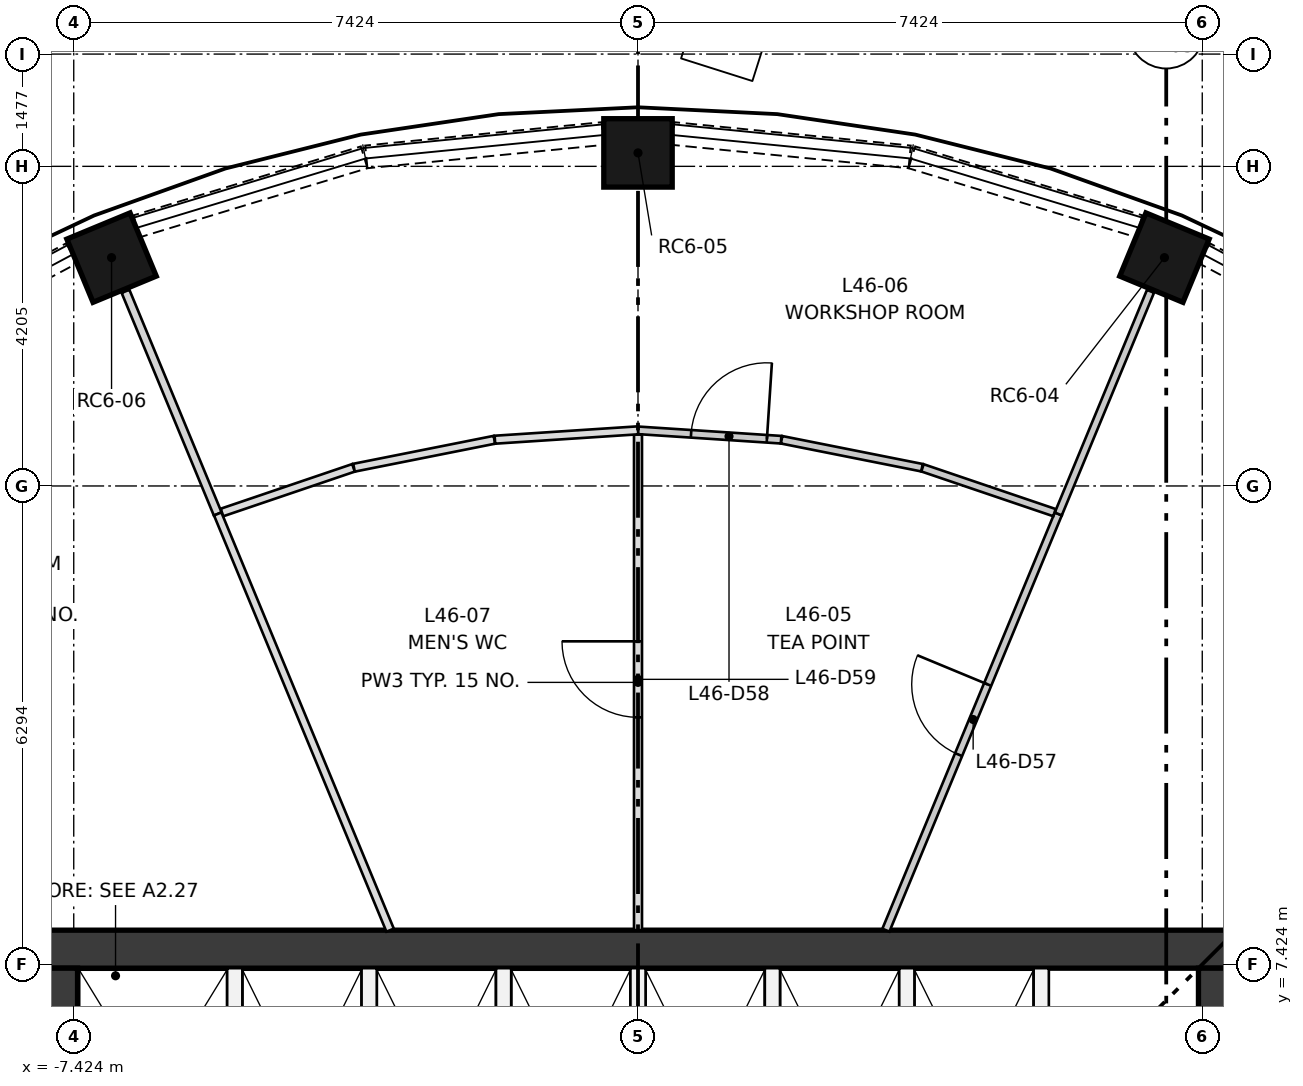
"""IFC4 building model, lengths in metres.
Left out: names, types, materials, properties, quantities, classifications, styles, units other than length and angle.
Written with IfcOpenShell. Run it as: python <this file> out.ifc"""

import sys

from ifc_helpers import new_model, si_unit, direction, frame, frame_2d, origin, origin_2d, place, context, subcontext, project, spatial, rectangle, extrude, element, fill, save


model = new_model("IFC4")
c1 = context("Model", 3, precision=1e-05, world=origin(), true_north=direction((0.0, 1.0)))
c2 = subcontext(c1, "Body", "Model", "MODEL_VIEW")
j1 = project(units=[si_unit("LENGTHUNIT", "METRE"), si_unit("PLANEANGLEUNIT", "RADIAN")], contexts=[c1])
p1 = place(None, origin())
s1 = spatial("IfcSite", under=j1, at=p1, CompositionType="ELEMENT")
p2 = place(p1, origin())
s2 = spatial("IfcBuilding", under=s1, at=p2, CompositionType="ELEMENT")
p3 = place(p2, frame((0.0, 0.0, 174.25)))
s3 = spatial("IfcBuildingStorey", under=s2, at=p3, CompositionType="ELEMENT", Elevation=174.25)
for number, where, z_axis, x_axis in (
    (1, (6.927, 16.722, 0.0), (0.0, 0.0, 1.0), (0.383, 0.924, 0.0)),
    (2, (0.0, 18.1, 0.0), (0.0, 0.0, 1.0), (0.0, 1.0, 0.0)),
    (3, (-6.927, 16.722, 0.0), (0.0, 0.0, 1.0), (-0.383, 0.924, 0.0)),
):
    element("IfcColumn", number, at=place(p3, frame(where, z_axis=z_axis, x_axis=x_axis)), inside=s3, PredefinedType="COLUMN", context=c2, shape_type="SweptSolid", body=[
        extrude(rectangle(XDim=0.9, YDim=0.9, at=origin_2d()), origin(), (0.0, 0.0, 1.0), 3.35),
    ])
p4 = place(p3, frame((-7.874, 7.624, 0.0), z_axis=(0.0, 0.0, 1.0), x_axis=(1.0, 0.0, 0.0)))
e4 = element("IfcWall", 4, at=p4, inside=s3, PredefinedType="SHEAR", context=c2, shape_type="SweptSolid", body=[
    extrude(rectangle(XDim=15.748, YDim=0.5, at=frame_2d((7.874, 0.0))), origin(), (0.0, 0.0, 1.0), 3.35),
])
p5 = place(p3, frame((-7.624, -7.374, 0.0), z_axis=(0.0, 0.0, 1.0), x_axis=(0.0, 1.0, 0.0)))
e5 = element("IfcWall", 5, at=p5, inside=s3, PredefinedType="SHEAR", context=c2, shape_type="SweptSolid", body=[
    extrude(rectangle(XDim=14.748, YDim=0.5, at=frame_2d((7.374, 0.0))), origin(), (0.0, 0.0, 1.0), 3.35),
])
p6 = place(p5, frame((6.874, 0.0, 0.0)))
e6 = element("IfcOpeningElement", 6, at=p6, cuts=e5, PredefinedType="OPENING", context=c2, shape_type="SweptSolid", body=[
    extrude(rectangle(XDim=1.0, YDim=2.1, at=frame_2d((0.5, 1.05))), frame((0.0, 0.26, 0.0), z_axis=(0.0, -1.0, 0.0), x_axis=(1.0, 0.0, 0.0)), (0.0, 0.0, 1.0), 0.52),
])
p7 = place(p5, frame((3.75, 0.0, 0.0)))
e7 = element("IfcOpeningElement", 7, at=p7, cuts=e5, PredefinedType="OPENING", context=c2, shape_type="SweptSolid", body=[
    extrude(rectangle(XDim=1.8, YDim=2.1, at=frame_2d((0.9, 1.05))), frame((0.0, 0.26, 0.0), z_axis=(0.0, -1.0, 0.0), x_axis=(1.0, 0.0, 0.0)), (0.0, 0.0, 1.0), 0.52),
])
p8 = place(p5, frame((9.198, 0.0, 0.0)))
e8 = element("IfcOpeningElement", 8, at=p8, cuts=e5, PredefinedType="OPENING", context=c2, shape_type="SweptSolid", body=[
    extrude(rectangle(XDim=1.8, YDim=2.1, at=frame_2d((0.9, 1.05))), frame((0.0, 0.26, 0.0), z_axis=(0.0, -1.0, 0.0), x_axis=(1.0, 0.0, 0.0)), (0.0, 0.0, 1.0), 0.52),
])
p9 = place(p3, frame((7.624, -7.374, 0.0), z_axis=(0.0, 0.0, 1.0), x_axis=(0.0, 1.0, 0.0)))
e9 = element("IfcWall", 9, at=p9, inside=s3, PredefinedType="SHEAR", context=c2, shape_type="SweptSolid", body=[
    extrude(rectangle(XDim=14.748, YDim=0.5, at=frame_2d((7.374, 0.0))), origin(), (0.0, 0.0, 1.0), 3.35),
])
p10 = place(p9, frame((6.874, 0.0, 0.0)))
e10 = element("IfcOpeningElement", 10, at=p10, cuts=e9, PredefinedType="OPENING", context=c2, shape_type="SweptSolid", body=[
    extrude(rectangle(XDim=1.0, YDim=2.1, at=frame_2d((0.5, 1.05))), frame((0.0, 0.26, 0.0), z_axis=(0.0, -1.0, 0.0), x_axis=(1.0, 0.0, 0.0)), (0.0, 0.0, 1.0), 0.52),
])
p11 = place(p9, frame((3.75, 0.0, 0.0)))
e11 = element("IfcOpeningElement", 11, at=p11, cuts=e9, PredefinedType="OPENING", context=c2, shape_type="SweptSolid", body=[
    extrude(rectangle(XDim=1.8, YDim=2.1, at=frame_2d((0.9, 1.05))), frame((0.0, 0.26, 0.0), z_axis=(0.0, -1.0, 0.0), x_axis=(1.0, 0.0, 0.0)), (0.0, 0.0, 1.0), 0.52),
])
p12 = place(p9, frame((9.198, 0.0, 0.0)))
e12 = element("IfcOpeningElement", 12, at=p12, cuts=e9, PredefinedType="OPENING", context=c2, shape_type="SweptSolid", body=[
    extrude(rectangle(XDim=1.8, YDim=2.1, at=frame_2d((0.9, 1.05))), frame((0.0, 0.26, 0.0), z_axis=(0.0, -1.0, 0.0), x_axis=(1.0, 0.0, 0.0)), (0.0, 0.0, 1.0), 0.52),
])
for number, where, z_axis, x_axis in (
    (13, (-5.305, 4.174, 0.0), (0.0, 0.0, 1.0), (0.0, 1.0, 0.0)),
    (14, (-3.537, 4.174, 0.0), (0.0, 0.0, 1.0), (0.0, 1.0, 0.0)),
    (15, (-1.769, 4.174, 0.0), (0.0, 0.0, 1.0), (0.0, 1.0, 0.0)),
    (16, (0.0, 4.174, 0.0), (0.0, 0.0, 1.0), (0.0, 1.0, 0.0)),
    (17, (1.769, 4.174, 0.0), (0.0, 0.0, 1.0), (0.0, 1.0, 0.0)),
    (18, (3.537, 4.174, 0.0), (0.0, 0.0, 1.0), (0.0, 1.0, 0.0)),
    (19, (5.305, 4.174, 0.0), (0.0, 0.0, 1.0), (0.0, 1.0, 0.0)),
):
    element("IfcWall", number, at=place(p3, frame(where, z_axis=z_axis, x_axis=x_axis)), inside=s3, PredefinedType="PARTITIONING", context=c2, shape_type="SweptSolid", body=[
        extrude(rectangle(XDim=3.2, YDim=0.2, at=frame_2d((1.6, 0.0))), origin(), (0.0, 0.0, 1.0), 3.0),
    ])
p13 = place(p3, frame((10.209, 15.306, 0.0), z_axis=(0.0, 0.0, 1.0), x_axis=(-0.882024038027, 0.47120441036, 0.0)))
e20 = element("IfcWall", 20, at=p13, inside=s3, PredefinedType="SOLIDWALL", context=c2, shape_type="SweptSolid", body=[
    extrude(rectangle(XDim=3.125, YDim=0.3, at=frame_2d((1.562, 0.0))), origin(), (0.0, 0.0, 1.0), 0.9),
])
p14 = place(p3, frame((6.596, 17.135, 0.0), z_axis=(0.0, 0.0, 1.0), x_axis=(-0.957001416136, 0.290083245834, 0.0)))
e21 = element("IfcWall", 21, at=p14, inside=s3, PredefinedType="SOLIDWALL", context=c2, shape_type="SweptSolid", body=[
    extrude(rectangle(XDim=3.127, YDim=0.3, at=frame_2d((1.563, 0.0))), origin(), (0.0, 0.0, 1.0), 0.9),
])
for number, where, z_axis, x_axis in (
    (22, (3.574, 18.048, 0.0), (0.0, 0.0, 1.0), (-0.995, 0.098, 0.0)),
    (23, (-0.464, 18.354, 0.0), (0.0, 0.0, 1.0), (-0.995, -0.098, 0.0)),
):
    element("IfcWall", number, at=place(p3, frame(where, z_axis=z_axis, x_axis=x_axis)), inside=s3, PredefinedType="SOLIDWALL", context=c2, shape_type="SweptSolid", body=[
        extrude(rectangle(XDim=3.125, YDim=0.3, at=frame_2d((1.563, 0.0))), origin(), (0.0, 0.0, 1.0), 0.9),
    ])
p15 = place(p3, frame((-3.604, 18.042, 0.0), z_axis=(0.0, 0.0, 1.0), x_axis=(-0.957001416136, -0.290083245834, 0.0)))
e24 = element("IfcWall", 24, at=p15, inside=s3, PredefinedType="SOLIDWALL", context=c2, shape_type="SweptSolid", body=[
    extrude(rectangle(XDim=3.127, YDim=0.3, at=frame_2d((1.563, 0.0))), origin(), (0.0, 0.0, 1.0), 0.9),
])
p16 = place(p3, frame((-7.452, 16.779, 0.0), z_axis=(0.0, 0.0, 1.0), x_axis=(-0.882024038027, -0.47120441036, 0.0)))
e25 = element("IfcWall", 25, at=p16, inside=s3, PredefinedType="SOLIDWALL", context=c2, shape_type="SweptSolid", body=[
    extrude(rectangle(XDim=3.125, YDim=0.3, at=frame_2d((1.562, 0.0))), origin(), (0.0, 0.0, 1.0), 0.9),
])
p17 = place(p3, frame((3.261, 7.874, 0.0), z_axis=(0.0, 0.0, 1.0), x_axis=(0.382690105068, 0.923876768559, 0.0)))
e26 = element("IfcWall", 26, at=p17, inside=s3, PredefinedType="PARTITIONING", context=c2, shape_type="SweptSolid", body=[
    extrude(rectangle(XDim=5.927, YDim=0.1, at=frame_2d((2.964, 0.0))), origin(), (0.0, 0.0, 1.0), 3.0),
])
p18 = place(p17, frame((2.5, 0.0, 0.0)))
e27 = element("IfcOpeningElement", 27, at=p18, cuts=e26, PredefinedType="OPENING", context=c2, shape_type="SweptSolid", body=[
    extrude(rectangle(XDim=1.0, YDim=2.1, at=frame_2d((0.5, 1.05))), frame((0.0, 0.06, 0.0), z_axis=(0.0, -1.0, 0.0), x_axis=(1.0, 0.0, 0.0)), (0.0, 0.0, 1.0), 0.12),
])
p19 = place(p3, frame((5.53, 13.35, 0.0), z_axis=(0.0, 0.0, 1.0), x_axis=(0.382689618566, 0.923876970079, 0.0)))
e28 = element("IfcWall", 28, at=p19, inside=s3, PredefinedType="PARTITIONING", context=c2, shape_type="SweptSolid", body=[
    extrude(rectangle(XDim=3.17, YDim=0.1, at=frame_2d((1.585, 0.0))), origin(), (0.0, 0.0, 1.0), 3.0),
])
p20 = place(p3, frame((0.0, 14.45, 0.0), z_axis=(0.0, 0.0, 1.0), x_axis=(0.997862900294, -0.065342422802, 0.0)))
e29 = element("IfcWall", 29, at=p20, inside=s3, PredefinedType="PARTITIONING", context=c2, shape_type="SweptSolid", body=[
    extrude(rectangle(XDim=1.887, YDim=0.1, at=frame_2d((0.943, 0.0))), origin(), (0.0, 0.0, 1.0), 3.0),
])
p21 = place(p20, frame((0.7, 0.0, 0.0)))
e30 = element("IfcOpeningElement", 30, at=p21, cuts=e29, PredefinedType="OPENING", context=c2, shape_type="SweptSolid", body=[
    extrude(rectangle(XDim=1.0, YDim=2.1, at=frame_2d((0.5, 1.05))), frame((0.0, 0.06, 0.0), z_axis=(0.0, -1.0, 0.0), x_axis=(1.0, 0.0, 0.0)), (0.0, 0.0, 1.0), 0.12),
])
p22 = place(p3, frame((1.889, 14.326, 0.0), z_axis=(0.0, 0.0, 1.0), x_axis=(0.980789493394, -0.195069140684, 0.0)))
e31 = element("IfcWall", 31, at=p22, inside=s3, PredefinedType="PARTITIONING", context=c2, shape_type="SweptSolid", body=[
    extrude(rectangle(XDim=1.884, YDim=0.1, at=frame_2d((0.942, 0.0))), origin(), (0.0, 0.0, 1.0), 3.0),
])
p23 = place(p3, frame((3.743, 13.957, 0.0), z_axis=(0.0, 0.0, 1.0), x_axis=(0.946938181516, -0.321415743839, 0.0)))
e32 = element("IfcWall", 32, at=p23, inside=s3, PredefinedType="PARTITIONING", context=c2, shape_type="SweptSolid", body=[
    extrude(rectangle(XDim=1.834, YDim=0.1, at=frame_2d((0.917, 0.0))), origin(), (0.0, 0.0, 1.0), 3.0),
])
p24 = place(p3, frame((0.0, 7.874, 0.0), z_axis=(0.0, 0.0, 1.0), x_axis=(0.0, 1.0, 0.0)))
e33 = element("IfcWall", 33, at=p24, inside=s3, PredefinedType="PARTITIONING", context=c2, shape_type="SweptSolid", body=[
    extrude(rectangle(XDim=6.52, YDim=0.105, at=frame_2d((3.26, 0.0))), origin(), (0.0, 0.0, 1.0), 3.0),
])
p25 = place(p24, frame((2.8, 0.0, 0.0)))
e34 = element("IfcOpeningElement", 34, at=p25, cuts=e33, PredefinedType="OPENING", context=c2, shape_type="SweptSolid", body=[
    extrude(rectangle(XDim=1.0, YDim=2.1, at=frame_2d((0.5, 1.05))), frame((0.0, 0.062, 0.0), z_axis=(0.0, -1.0, 0.0), x_axis=(1.0, 0.0, 0.0)), (0.0, 0.0, 1.0), 0.125),
])
p26 = place(p3, frame((-3.743, 13.957, 0.0), z_axis=(0.0, 0.0, 1.0), x_axis=(-0.946932980831, -0.321431065415, 0.0)))
e35 = element("IfcWall", 35, at=p26, inside=s3, PredefinedType="PARTITIONING", context=c2, shape_type="SweptSolid", body=[
    extrude(rectangle(XDim=1.828, YDim=0.105, at=frame_2d((0.914, 0.0))), origin(), (0.0, 0.0, 1.0), 3.0),
])
p27 = place(p3, frame((-1.889, 14.326, 0.0), z_axis=(0.0, 0.0, 1.0), x_axis=(-0.980784560384, -0.195093941763, 0.0)))
e36 = element("IfcWall", 36, at=p27, inside=s3, PredefinedType="PARTITIONING", context=c2, shape_type="SweptSolid", body=[
    extrude(rectangle(XDim=1.883, YDim=0.105, at=frame_2d((0.942, 0.0))), origin(), (0.0, 0.0, 1.0), 3.0),
])
p28 = place(p3, frame((0.0, 14.45, 0.0), z_axis=(0.0, 0.0, 1.0), x_axis=(-0.997862900294, -0.065342422802, 0.0)))
e37 = element("IfcWall", 37, at=p28, inside=s3, PredefinedType="PARTITIONING", context=c2, shape_type="SweptSolid", body=[
    extrude(rectangle(XDim=1.887, YDim=0.105, at=frame_2d((0.943, 0.0))), origin(), (0.0, 0.0, 1.0), 3.0),
])
p29 = place(p3, frame((-5.53, 13.35, 0.0), z_axis=(0.0, 0.0, 1.0), x_axis=(-0.382689618566, 0.923876970079, 0.0)))
e38 = element("IfcWall", 38, at=p29, inside=s3, PredefinedType="PARTITIONING", context=c2, shape_type="SweptSolid", body=[
    extrude(rectangle(XDim=3.17, YDim=0.11, at=frame_2d((1.585, 0.0))), origin(), (0.0, 0.0, 1.0), 3.0),
])
p30 = place(p3, frame((-3.261, 7.874, 0.0), z_axis=(0.0, 0.0, 1.0), x_axis=(-0.382690105068, 0.923876768559, 0.0)))
e39 = element("IfcWall", 39, at=p30, inside=s3, PredefinedType="PARTITIONING", context=c2, shape_type="SweptSolid", body=[
    extrude(rectangle(XDim=5.927, YDim=0.105, at=frame_2d((2.964, 0.0))), origin(), (0.0, 0.0, 1.0), 3.0),
])
p31 = place(p18, origin())
e40 = element("IfcDoor", 40, at=p31, inside=s3, OperationType="SINGLE_SWING_RIGHT", PredefinedType="DOOR", context=c2, shape_type="SweptSolid", body=[
    extrude(rectangle(XDim=1.0, YDim=2.1, at=frame_2d((0.5, 1.05))), frame((0.0, 0.025, 0.0), z_axis=(0.0, -1.0, 0.0), x_axis=(1.0, 0.0, 0.0)), (0.0, 0.0, 1.0), 0.05),
])
fill(e27, e40)
p32 = place(p21, origin())
e41 = element("IfcDoor", 41, at=p32, inside=s3, OperationType="SINGLE_SWING_RIGHT", PredefinedType="DOOR", context=c2, shape_type="SweptSolid", body=[
    extrude(rectangle(XDim=1.0, YDim=2.1, at=frame_2d((0.5, 1.05))), frame((0.0, 0.025, 0.0), z_axis=(0.0, -1.0, 0.0), x_axis=(1.0, 0.0, 0.0)), (0.0, 0.0, 1.0), 0.05),
])
fill(e30, e41)
p33 = place(p25, origin())
e42 = element("IfcDoor", 42, at=p33, inside=s3, OperationType="SINGLE_SWING_RIGHT", PredefinedType="DOOR", context=c2, shape_type="SweptSolid", body=[
    extrude(rectangle(XDim=1.0, YDim=2.1, at=frame_2d((0.5, 1.05))), frame((0.0, 0.025, 0.0), z_axis=(0.0, -1.0, 0.0), x_axis=(1.0, 0.0, 0.0)), (0.0, 0.0, 1.0), 0.05),
])
fill(e34, e42)
save(model, sys.argv[1])
